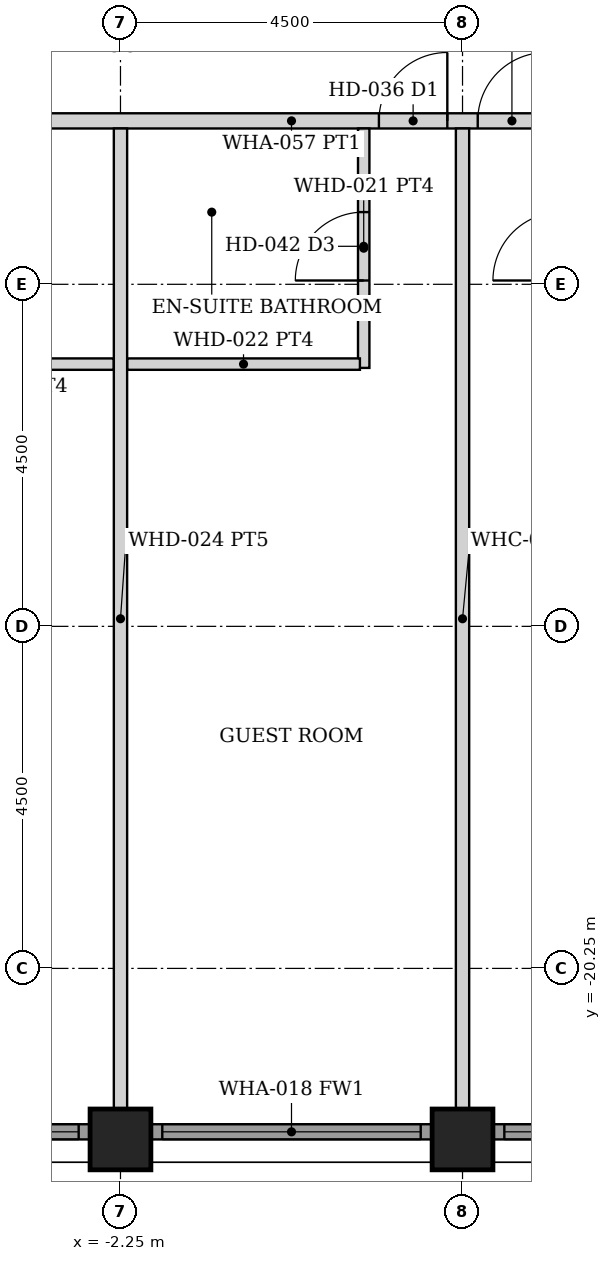
"""IFC4 building model, lengths in metres.
Left out: names, types, materials, properties, quantities, classifications, styles, units other than length and angle.
Written with IfcOpenShell. Run it as: python <this file> out.ifc"""

import sys

from ifc_helpers import new_model, si_unit, direction, frame, frame_2d, origin, origin_2d, place, context, subcontext, project, spatial, rectangle, hollow_rectangle, extrude, element, fill, save


model = new_model("IFC4")
c1 = context("Model", 3, precision=1e-05, world=origin(), true_north=direction((0.0, 1.0)))
c2 = subcontext(c1, "Body", "Model", "MODEL_VIEW")
j1 = project(units=[si_unit("LENGTHUNIT", "METRE"), si_unit("PLANEANGLEUNIT", "RADIAN")], contexts=[c1])
p1 = place(None, origin())
s1 = spatial("IfcSite", under=j1, at=p1, CompositionType="ELEMENT")
p2 = place(p1, origin())
s2 = spatial("IfcBuilding", under=s1, at=p2, CompositionType="ELEMENT")
p3 = place(p2, frame((0.0, 0.0, 150.8)))
s3 = spatial("IfcBuildingStorey", under=s2, at=p3, CompositionType="ELEMENT", Elevation=150.8)
for number, where, z_axis, x_axis in (
    (1, (-2.25, -22.5, 0.0), (0.0, 0.0, 1.0), (0.0, 1.0, 0.0)),
    (2, (2.25, -22.5, 0.0), (0.0, 0.0, 1.0), (0.0, 1.0, 0.0)),
):
    element("IfcColumn", number, at=place(p3, frame(where, z_axis=z_axis, x_axis=x_axis)), inside=s3, PredefinedType="COLUMN", context=c2, shape_type="SweptSolid", body=[
        extrude(hollow_rectangle(XDim=0.8, YDim=0.8, WallThickness=0.05, at=origin_2d()), origin(), (0.0, 0.0, 1.0), 3.6),
    ])
p4 = place(p3, frame((-6.345, -22.4, 0.0), z_axis=(0.0, 0.0, 1.0), x_axis=(1.0, 0.0, 0.0)))
e3 = element("IfcWall", 3, at=p4, inside=s3, PredefinedType="SOLIDWALL", context=c2, shape_type="SweptSolid", body=[
    extrude(rectangle(XDim=3.69, YDim=0.2, at=frame_2d((1.845, 0.0))), origin(), (0.0, 0.0, 1.0), 2.479),
])
p5 = place(p4, frame((0.145, 0.0, 0.3)))
e4 = element("IfcOpeningElement", 4, at=p5, cuts=e3, PredefinedType="OPENING", context=c2, shape_type="SweptSolid", body=[
    extrude(rectangle(XDim=3.4, YDim=2.029, at=frame_2d((1.7, 1.015))), frame((0.0, 0.11, 0.0), z_axis=(0.0, -1.0, 0.0), x_axis=(1.0, 0.0, 0.0)), (0.0, 0.0, 1.0), 0.22),
])
p6 = place(p3, frame((-1.845, -22.4, 0.0), z_axis=(0.0, 0.0, 1.0), x_axis=(1.0, 0.0, 0.0)))
e5 = element("IfcWall", 5, at=p6, inside=s3, PredefinedType="SOLIDWALL", context=c2, shape_type="SweptSolid", body=[
    extrude(rectangle(XDim=3.69, YDim=0.2, at=frame_2d((1.845, 0.0))), origin(), (0.0, 0.0, 1.0), 2.479),
])
p7 = place(p6, frame((0.145, 0.0, 0.3)))
e6 = element("IfcOpeningElement", 6, at=p7, cuts=e5, PredefinedType="OPENING", context=c2, shape_type="SweptSolid", body=[
    extrude(rectangle(XDim=3.4, YDim=2.029, at=frame_2d((1.7, 1.015))), frame((0.0, 0.11, 0.0), z_axis=(0.0, -1.0, 0.0), x_axis=(1.0, 0.0, 0.0)), (0.0, 0.0, 1.0), 0.22),
])
p8 = place(p3, frame((2.655, -22.4, 0.0), z_axis=(0.0, 0.0, 1.0), x_axis=(1.0, 0.0, 0.0)))
e7 = element("IfcWall", 7, at=p8, inside=s3, PredefinedType="SOLIDWALL", context=c2, shape_type="SweptSolid", body=[
    extrude(rectangle(XDim=3.69, YDim=0.2, at=frame_2d((1.845, 0.0))), origin(), (0.0, 0.0, 1.0), 2.479),
])
p9 = place(p8, frame((0.145, 0.0, 0.3)))
e8 = element("IfcOpeningElement", 8, at=p9, cuts=e7, PredefinedType="OPENING", context=c2, shape_type="SweptSolid", body=[
    extrude(rectangle(XDim=3.4, YDim=2.029, at=frame_2d((1.7, 1.015))), frame((0.0, 0.11, 0.0), z_axis=(0.0, -1.0, 0.0), x_axis=(1.0, 0.0, 0.0)), (0.0, 0.0, 1.0), 0.22),
])
p10 = place(p3, frame((-22.3, -9.1, 0.0), z_axis=(0.0, 0.0, 1.0), x_axis=(1.0, 0.0, 0.0)))
e9 = element("IfcWall", 9, at=p10, inside=s3, PredefinedType="PARTITIONING", context=c2, shape_type="SweptSolid", body=[
    extrude(rectangle(XDim=44.6, YDim=0.2, at=frame_2d((22.3, 0.0))), origin(), (0.0, 0.0, 1.0), 2.473),
])
p11 = place(p10, frame((6.75, 0.0, 0.0)))
e10 = element("IfcOpeningElement", 10, at=p11, cuts=e9, PredefinedType="OPENING", context=c2, shape_type="SweptSolid", body=[
    extrude(rectangle(XDim=0.9, YDim=2.1, at=frame_2d((0.45, 1.05))), frame((0.0, 0.11, 0.0), z_axis=(0.0, -1.0, 0.0), x_axis=(1.0, 0.0, 0.0)), (0.0, 0.0, 1.0), 0.22),
])
p12 = place(p10, frame((15.75, 0.0, 0.0)))
e11 = element("IfcOpeningElement", 11, at=p12, cuts=e9, PredefinedType="OPENING", context=c2, shape_type="SweptSolid", body=[
    extrude(rectangle(XDim=0.9, YDim=2.1, at=frame_2d((0.45, 1.05))), frame((0.0, 0.11, 0.0), z_axis=(0.0, -1.0, 0.0), x_axis=(1.0, 0.0, 0.0)), (0.0, 0.0, 1.0), 0.22),
])
p13 = place(p10, frame((23.45, 0.0, 0.0)))
e12 = element("IfcOpeningElement", 12, at=p13, cuts=e9, PredefinedType="OPENING", context=c2, shape_type="SweptSolid", body=[
    extrude(rectangle(XDim=0.9, YDim=2.1, at=frame_2d((0.45, 1.05))), frame((0.0, 0.11, 0.0), z_axis=(0.0, -1.0, 0.0), x_axis=(1.0, 0.0, 0.0)), (0.0, 0.0, 1.0), 0.22),
])
p14 = place(p10, frame((24.75, 0.0, 0.0)))
e13 = element("IfcOpeningElement", 13, at=p14, cuts=e9, PredefinedType="OPENING", context=c2, shape_type="SweptSolid", body=[
    extrude(rectangle(XDim=0.9, YDim=2.1, at=frame_2d((0.45, 1.05))), frame((0.0, 0.11, 0.0), z_axis=(0.0, -1.0, 0.0), x_axis=(1.0, 0.0, 0.0)), (0.0, 0.0, 1.0), 0.22),
])
p15 = place(p10, frame((36.95, 0.0, 0.0)))
e14 = element("IfcOpeningElement", 14, at=p15, cuts=e9, PredefinedType="OPENING", context=c2, shape_type="SweptSolid", body=[
    extrude(rectangle(XDim=0.9, YDim=2.1, at=frame_2d((0.45, 1.05))), frame((0.0, 0.11, 0.0), z_axis=(0.0, -1.0, 0.0), x_axis=(1.0, 0.0, 0.0)), (0.0, 0.0, 1.0), 0.22),
])
p16 = place(p10, frame((38.85, 0.0, 0.0)))
e15 = element("IfcOpeningElement", 15, at=p16, cuts=e9, PredefinedType="OPENING", context=c2, shape_type="SweptSolid", body=[
    extrude(rectangle(XDim=0.9, YDim=2.1, at=frame_2d((0.45, 1.05))), frame((0.0, 0.11, 0.0), z_axis=(0.0, -1.0, 0.0), x_axis=(1.0, 0.0, 0.0)), (0.0, 0.0, 1.0), 0.22),
])
p17 = place(p10, frame((4.85, 0.0, 0.0)))
e16 = element("IfcOpeningElement", 16, at=p17, cuts=e9, PredefinedType="OPENING", context=c2, shape_type="SweptSolid", body=[
    extrude(rectangle(XDim=0.9, YDim=2.1, at=frame_2d((0.45, 1.05))), frame((0.0, 0.11, 0.0), z_axis=(0.0, -1.0, 0.0), x_axis=(1.0, 0.0, 0.0)), (0.0, 0.0, 1.0), 0.22),
])
p18 = place(p3, frame((-5.4, -12.3, 0.0), z_axis=(0.0, 0.0, 1.0), x_axis=(1.0, 0.0, 0.0)))
e17 = element("IfcWall", 17, at=p18, inside=s3, PredefinedType="PARTITIONING", context=c2, shape_type="SweptSolid", body=[
    extrude(rectangle(XDim=3.062, YDim=0.15, at=frame_2d((1.531, 0.0))), origin(), (0.0, 0.0, 1.0), 2.473),
])
p19 = place(p3, frame((0.95, -12.35, 0.0), z_axis=(0.0, 0.0, 1.0), x_axis=(0.0, 1.0, 0.0)))
e18 = element("IfcWall", 18, at=p19, inside=s3, PredefinedType="PARTITIONING", context=c2, shape_type="SweptSolid", body=[
    extrude(rectangle(XDim=3.15, YDim=0.15, at=frame_2d((1.575, 0.0))), origin(), (0.0, 0.0, 1.0), 2.473),
])
p20 = place(p19, frame((1.15, 0.0, 0.0)))
e19 = element("IfcOpeningElement", 19, at=p20, cuts=e18, PredefinedType="OPENING", context=c2, shape_type="SweptSolid", body=[
    extrude(rectangle(XDim=0.9, YDim=2.1, at=frame_2d((0.45, 1.05))), frame((0.0, 0.085, 0.0), z_axis=(0.0, -1.0, 0.0), x_axis=(1.0, 0.0, 0.0)), (0.0, 0.0, 1.0), 0.17),
])
p21 = place(p3, frame((-2.163, -12.3, 0.0), z_axis=(0.0, 0.0, 1.0), x_axis=(1.0, 0.0, 0.0)))
e20 = element("IfcWall", 20, at=p21, inside=s3, PredefinedType="PARTITIONING", context=c2, shape_type="SweptSolid", body=[
    extrude(rectangle(XDim=3.062, YDim=0.15, at=frame_2d((1.531, 0.0))), origin(), (0.0, 0.0, 1.0), 2.473),
])
for number, where, z_axis, x_axis in (
    (21, (-2.25, -22.1, 0.0), (0.0, 0.0, 1.0), (0.0, 1.0, 0.0)),
    (22, (2.25, -22.1, 0.0), (0.0, 0.0, 1.0), (0.0, 1.0, 0.0)),
):
    element("IfcWall", number, at=place(p3, frame(where, z_axis=z_axis, x_axis=x_axis)), inside=s3, PredefinedType="PARTITIONING", context=c2, shape_type="SweptSolid", body=[
        extrude(rectangle(XDim=12.9, YDim=0.175, at=frame_2d((6.45, 0.0))), origin(), (0.0, 0.0, 1.0), 2.473),
    ])
p22 = place(p5, origin())
e23 = element("IfcWindow", 23, at=p22, inside=s3, PartitioningType="SINGLE_PANEL", PredefinedType="WINDOW", context=c2, shape_type="SweptSolid", body=[
    extrude(rectangle(XDim=3.4, YDim=2.029, at=frame_2d((1.7, 1.015))), frame((0.0, 0.03, 0.0), z_axis=(0.0, -1.0, 0.0), x_axis=(1.0, 0.0, 0.0)), (0.0, 0.0, 1.0), 0.06),
])
fill(e4, e23)
p23 = place(p7, origin())
e24 = element("IfcWindow", 24, at=p23, inside=s3, PartitioningType="SINGLE_PANEL", PredefinedType="WINDOW", context=c2, shape_type="SweptSolid", body=[
    extrude(rectangle(XDim=3.4, YDim=2.029, at=frame_2d((1.7, 1.015))), frame((0.0, 0.03, 0.0), z_axis=(0.0, -1.0, 0.0), x_axis=(1.0, 0.0, 0.0)), (0.0, 0.0, 1.0), 0.06),
])
fill(e6, e24)
p24 = place(p9, origin())
e25 = element("IfcWindow", 25, at=p24, inside=s3, PartitioningType="SINGLE_PANEL", PredefinedType="WINDOW", context=c2, shape_type="SweptSolid", body=[
    extrude(rectangle(XDim=3.4, YDim=2.029, at=frame_2d((1.7, 1.015))), frame((0.0, 0.03, 0.0), z_axis=(0.0, -1.0, 0.0), x_axis=(1.0, 0.0, 0.0)), (0.0, 0.0, 1.0), 0.06),
])
fill(e8, e25)
p25 = place(p13, origin())
e26 = element("IfcDoor", 26, at=p25, inside=s3, OperationType="SINGLE_SWING_RIGHT", PredefinedType="DOOR", context=c2, shape_type="SweptSolid", body=[
    extrude(rectangle(XDim=0.9, YDim=2.1, at=frame_2d((0.45, 1.05))), frame((0.0, 0.025, 0.0), z_axis=(0.0, -1.0, 0.0), x_axis=(1.0, 0.0, 0.0)), (0.0, 0.0, 1.0), 0.05),
])
fill(e12, e26)
p26 = place(p20, origin())
e27 = element("IfcDoor", 27, at=p26, inside=s3, OperationType="SINGLE_SWING_LEFT", PredefinedType="DOOR", context=c2, shape_type="SweptSolid", body=[
    extrude(rectangle(XDim=0.9, YDim=2.1, at=frame_2d((0.45, 1.05))), frame((0.0, 0.025, 0.0), z_axis=(0.0, -1.0, 0.0), x_axis=(1.0, 0.0, 0.0)), (0.0, 0.0, 1.0), 0.05),
])
fill(e19, e27)
p27 = place(p14, origin())
e28 = element("IfcDoor", 28, at=p27, inside=s3, OperationType="SINGLE_SWING_RIGHT", PredefinedType="DOOR", context=c2, shape_type="SweptSolid", body=[
    extrude(rectangle(XDim=0.9, YDim=2.1, at=frame_2d((0.45, 1.05))), frame((0.0, 0.025, 0.0), z_axis=(0.0, -1.0, 0.0), x_axis=(1.0, 0.0, 0.0)), (0.0, 0.0, 1.0), 0.05),
])
fill(e13, e28)
save(model, sys.argv[1])
